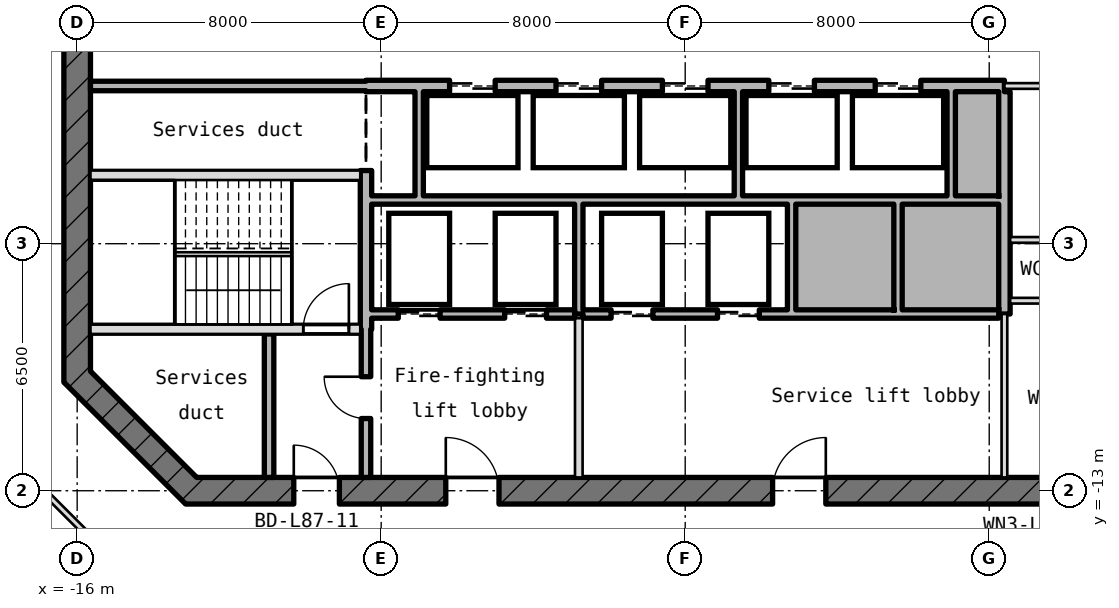
"""IFC4 building model, lengths in metres.
Left out: names, types, materials, properties, quantities, classifications, styles, units other than length and angle.
Written with IfcOpenShell. Run it as: python <this file> out.ifc"""

import sys

from ifc_helpers import new_model, si_unit, direction, frame, frame_2d, origin, place, context, subcontext, project, spatial, rectangle, extrude, element, fill, save


model = new_model("IFC4")
c1 = context("Model", 3, precision=1e-05, world=origin(), true_north=direction((0.0, 1.0)))
c2 = subcontext(c1, "Body", "Model", "MODEL_VIEW")
j1 = project(units=[si_unit("LENGTHUNIT", "METRE"), si_unit("PLANEANGLEUNIT", "RADIAN")], contexts=[c1])
p1 = place(None, origin())
s1 = spatial("IfcSite", under=j1, at=p1, CompositionType="ELEMENT")
p2 = place(p1, origin())
s2 = spatial("IfcBuilding", under=s1, at=p2, CompositionType="ELEMENT")
p3 = place(p2, frame((0.0, 0.0, 384.1)))
s3 = spatial("IfcBuildingStorey", under=s2, at=p3, CompositionType="ELEMENT", Elevation=384.1)
p4 = place(p3, frame((-16.0, 10.145, -0.18), z_axis=(0.0, 0.0, 1.0), x_axis=(0.0, -1.0, 0.0)))
e1 = element("IfcWall", 1, at=p4, inside=s3, PredefinedType="SHEAR", context=c2, shape_type="SweptSolid", body=[
    extrude(rectangle(XDim=20.29, YDim=0.7, at=frame_2d((10.145, 0.0))), origin(), (0.0, 0.0, 1.0), 4.15),
])
p5 = place(p4, frame((8.945, 0.0, 0.18)))
e2 = element("IfcOpeningElement", 2, at=p5, cuts=e1, PredefinedType="OPENING", context=c2, shape_type="SweptSolid", body=[
    extrude(rectangle(XDim=2.4, YDim=2.1, at=frame_2d((1.2, 1.05))), frame((0.0, 0.36, 0.0), z_axis=(0.0, -1.0, 0.0), x_axis=(1.0, 0.0, 0.0)), (0.0, 0.0, 1.0), 0.72),
])
p6 = place(p4, frame((5.545, 0.0, 0.18)))
e3 = element("IfcOpeningElement", 3, at=p6, cuts=e1, PredefinedType="OPENING", context=c2, shape_type="SweptSolid", body=[
    extrude(rectangle(XDim=1.2, YDim=2.1, at=frame_2d((0.6, 1.05))), frame((0.0, 0.36, 0.0), z_axis=(0.0, -1.0, 0.0), x_axis=(1.0, 0.0, 0.0)), (0.0, 0.0, 1.0), 0.72),
])
p7 = place(p3, frame((-16.103, -9.897, -0.18), z_axis=(0.0, 0.0, 1.0), x_axis=(0.707106781187, -0.707106781187, 0.0)))
e4 = element("IfcWall", 4, at=p7, inside=s3, PredefinedType="SHEAR", context=c2, shape_type="SweptSolid", body=[
    extrude(rectangle(XDim=4.533, YDim=0.7, at=frame_2d((2.266, 0.0))), origin(), (0.0, 0.0, 1.0), 4.15),
])
p8 = place(p3, frame((-13.145, -13.0, -0.18), z_axis=(0.0, 0.0, 1.0), x_axis=(1.0, 0.0, 0.0)))
e5 = element("IfcWall", 5, at=p8, inside=s3, PredefinedType="SHEAR", context=c2, shape_type="SweptSolid", body=[
    extrude(rectangle(XDim=26.29, YDim=0.7, at=frame_2d((13.145, 0.0))), origin(), (0.0, 0.0, 1.0), 4.15),
])
p9 = place(p8, frame((2.845, 0.0, 0.18)))
e6 = element("IfcOpeningElement", 6, at=p9, cuts=e5, PredefinedType="OPENING", context=c2, shape_type="SweptSolid", body=[
    extrude(rectangle(XDim=1.2, YDim=2.1, at=frame_2d((0.6, 1.05))), frame((0.0, 0.36, 0.0), z_axis=(0.0, -1.0, 0.0), x_axis=(1.0, 0.0, 0.0)), (0.0, 0.0, 1.0), 0.72),
])
p10 = place(p8, frame((6.845, 0.0, 0.18)))
e7 = element("IfcOpeningElement", 7, at=p10, cuts=e5, PredefinedType="OPENING", context=c2, shape_type="SweptSolid", body=[
    extrude(rectangle(XDim=1.4, YDim=2.1, at=frame_2d((0.7, 1.05))), frame((0.0, 0.36, 0.0), z_axis=(0.0, -1.0, 0.0), x_axis=(1.0, 0.0, 0.0)), (0.0, 0.0, 1.0), 0.72),
])
p11 = place(p8, frame((15.445, 0.0, 0.18)))
e8 = element("IfcOpeningElement", 8, at=p11, cuts=e5, PredefinedType="OPENING", context=c2, shape_type="SweptSolid", body=[
    extrude(rectangle(XDim=1.4, YDim=2.1, at=frame_2d((0.7, 1.05))), frame((0.0, 0.36, 0.0), z_axis=(0.0, -1.0, 0.0), x_axis=(1.0, 0.0, 0.0)), (0.0, 0.0, 1.0), 0.72),
])
p12 = place(p3, frame((-15.65, -8.75, -0.18), z_axis=(0.0, 0.0, 1.0), x_axis=(1.0, 0.0, 0.0)))
e9 = element("IfcWall", 9, at=p12, inside=s3, PredefinedType="SHEAR", context=c2, shape_type="SweptSolid", body=[
    extrude(rectangle(XDim=7.1, YDim=0.25, at=frame_2d((3.55, 0.0))), origin(), (0.0, 0.0, 1.0), 4.15),
])
p13 = place(p12, frame((5.6, 0.0, 0.18)))
e10 = element("IfcOpeningElement", 10, at=p13, cuts=e9, PredefinedType="OPENING", context=c2, shape_type="SweptSolid", body=[
    extrude(rectangle(XDim=1.2, YDim=2.1, at=frame_2d((0.6, 1.05))), frame((0.0, 0.135, 0.0), z_axis=(0.0, -1.0, 0.0), x_axis=(1.0, 0.0, 0.0)), (0.0, 0.0, 1.0), 0.27),
])
p14 = place(p3, frame((-8.25, -8.35, 0.0), z_axis=(0.0, 0.0, 1.0), x_axis=(1.0, 0.0, 0.0)))
e11 = element("IfcWall", 11, at=p14, inside=s3, PredefinedType="STANDARD", context=c2, shape_type="SweptSolid", body=[
    extrude(rectangle(XDim=5.34, YDim=0.22, at=frame_2d((2.67, 0.0))), origin(), (0.0, 0.0, 1.0), 3.97),
])
p15 = place(p14, frame((0.7, 0.0, 0.0)))
e12 = element("IfcOpeningElement", 12, at=p15, cuts=e11, PredefinedType="OPENING", context=c2, shape_type="SweptSolid", body=[
    extrude(rectangle(XDim=1.1, YDim=2.1, at=frame_2d((0.55, 1.05))), frame((0.0, 0.12, 0.0), z_axis=(0.0, -1.0, 0.0), x_axis=(1.0, 0.0, 0.0)), (0.0, 0.0, 1.0), 0.24),
])
p16 = place(p14, frame((3.5, 0.0, 0.0)))
e13 = element("IfcOpeningElement", 13, at=p16, cuts=e11, PredefinedType="OPENING", context=c2, shape_type="SweptSolid", body=[
    extrude(rectangle(XDim=1.1, YDim=2.1, at=frame_2d((0.55, 1.05))), frame((0.0, 0.12, 0.0), z_axis=(0.0, -1.0, 0.0), x_axis=(1.0, 0.0, 0.0)), (0.0, 0.0, 1.0), 0.24),
])
p17 = place(p3, frame((-2.69, -8.35, 0.0), z_axis=(0.0, 0.0, 1.0), x_axis=(1.0, 0.0, 0.0)))
e14 = element("IfcWall", 14, at=p17, inside=s3, PredefinedType="STANDARD", context=c2, shape_type="SweptSolid", body=[
    extrude(rectangle(XDim=10.94, YDim=0.22, at=frame_2d((5.47, 0.0))), origin(), (0.0, 0.0, 1.0), 3.97),
])
p18 = place(p17, frame((0.74, 0.0, 0.0)))
e15 = element("IfcOpeningElement", 15, at=p18, cuts=e14, PredefinedType="OPENING", context=c2, shape_type="SweptSolid", body=[
    extrude(rectangle(XDim=1.1, YDim=2.1, at=frame_2d((0.55, 1.05))), frame((0.0, 0.12, 0.0), z_axis=(0.0, -1.0, 0.0), x_axis=(1.0, 0.0, 0.0)), (0.0, 0.0, 1.0), 0.24),
])
p19 = place(p17, frame((3.54, 0.0, 0.0)))
e16 = element("IfcOpeningElement", 16, at=p19, cuts=e14, PredefinedType="OPENING", context=c2, shape_type="SweptSolid", body=[
    extrude(rectangle(XDim=1.1, YDim=2.1, at=frame_2d((0.55, 1.05))), frame((0.0, 0.12, 0.0), z_axis=(0.0, -1.0, 0.0), x_axis=(1.0, 0.0, 0.0)), (0.0, 0.0, 1.0), 0.24),
])
p20 = place(p3, frame((8.55, -8.0, 0.0), z_axis=(0.0, 0.0, 1.0), x_axis=(1.0, 0.0, 0.0)))
e17 = element("IfcWall", 17, at=p20, inside=s3, PredefinedType="PARTITIONING", context=c2, shape_type="SweptSolid", body=[
    extrude(rectangle(XDim=7.1, YDim=0.15, at=frame_2d((3.55, 0.0))), origin(), (0.0, 0.0, 1.0), 3.97),
])
p21 = place(p20, frame((2.975, 0.0, 0.0)))
e18 = element("IfcOpeningElement", 18, at=p21, cuts=e17, PredefinedType="OPENING", context=c2, shape_type="SweptSolid", body=[
    extrude(rectangle(XDim=1.0, YDim=2.1, at=frame_2d((0.5, 1.05))), frame((0.0, 0.085, 0.0), z_axis=(0.0, -1.0, 0.0), x_axis=(1.0, 0.0, 0.0)), (0.0, 0.0, 1.0), 0.17),
])
p22 = place(p3, frame((8.55, -6.4, 0.0), z_axis=(0.0, 0.0, 1.0), x_axis=(1.0, 0.0, 0.0)))
e19 = element("IfcWall", 19, at=p22, inside=s3, PredefinedType="PARTITIONING", context=c2, shape_type="SweptSolid", body=[
    extrude(rectangle(XDim=7.1, YDim=0.15, at=frame_2d((3.55, 0.0))), origin(), (0.0, 0.0, 1.0), 3.97),
])
p23 = place(p22, frame((2.975, 0.0, 0.0)))
e20 = element("IfcOpeningElement", 20, at=p23, cuts=e19, PredefinedType="OPENING", context=c2, shape_type="SweptSolid", body=[
    extrude(rectangle(XDim=1.0, YDim=2.1, at=frame_2d((0.5, 1.05))), frame((0.0, 0.085, 0.0), z_axis=(0.0, -1.0, 0.0), x_axis=(1.0, 0.0, 0.0)), (0.0, 0.0, 1.0), 0.17),
])
p24 = place(p3, frame((-8.25, -5.35, 0.0), z_axis=(0.0, 0.0, 1.0), x_axis=(1.0, 0.0, 0.0)))
e21 = element("IfcWall", 21, at=p24, inside=s3, PredefinedType="STANDARD", context=c2, shape_type="SweptSolid", body=[
    extrude(rectangle(XDim=16.5, YDim=0.22, at=frame_2d((8.25, 0.0))), origin(), (0.0, 0.0, 1.0), 3.97),
])
p25 = place(p3, frame((-15.65, -4.7, -0.18), z_axis=(0.0, 0.0, 1.0), x_axis=(1.0, 0.0, 0.0)))
e22 = element("IfcWall", 22, at=p25, inside=s3, PredefinedType="SHEAR", context=c2, shape_type="SweptSolid", body=[
    extrude(rectangle(XDim=7.1, YDim=0.25, at=frame_2d((3.55, 0.0))), origin(), (0.0, 0.0, 1.0), 4.15),
])
p26 = place(p3, frame((-15.65, -2.35, 0.0), z_axis=(0.0, 0.0, 1.0), x_axis=(1.0, 0.0, 0.0)))
e23 = element("IfcWall", 23, at=p26, inside=s3, PredefinedType="STANDARD", context=c2, shape_type="SweptSolid", body=[
    extrude(rectangle(XDim=7.25, YDim=0.25, at=frame_2d((3.625, 0.0))), origin(), (0.0, 0.0, 1.0), 3.97),
])
p27 = place(p3, frame((-8.4, -2.35, -0.18), z_axis=(0.0, 0.0, 1.0), x_axis=(1.0, 0.0, 0.0)))
e24 = element("IfcWall", 24, at=p27, inside=s3, PredefinedType="SHEAR", context=c2, shape_type="SweptSolid", body=[
    extrude(rectangle(XDim=16.8, YDim=0.3, at=frame_2d((8.4, 0.0))), origin(), (0.0, 0.0, 1.0), 4.15),
])
p28 = place(p27, frame((2.2, 0.0, 0.18)))
e25 = element("IfcOpeningElement", 25, at=p28, cuts=e24, PredefinedType="OPENING", context=c2, shape_type="SweptSolid", body=[
    extrude(rectangle(XDim=1.2, YDim=2.1, at=frame_2d((0.6, 1.05))), frame((0.0, 0.16, 0.0), z_axis=(0.0, -1.0, 0.0), x_axis=(1.0, 0.0, 0.0)), (0.0, 0.0, 1.0), 0.32),
])
p29 = place(p27, frame((5.0, 0.0, 0.18)))
e26 = element("IfcOpeningElement", 26, at=p29, cuts=e24, PredefinedType="OPENING", context=c2, shape_type="SweptSolid", body=[
    extrude(rectangle(XDim=1.2, YDim=2.1, at=frame_2d((0.6, 1.05))), frame((0.0, 0.16, 0.0), z_axis=(0.0, -1.0, 0.0), x_axis=(1.0, 0.0, 0.0)), (0.0, 0.0, 1.0), 0.32),
])
p30 = place(p27, frame((7.8, 0.0, 0.18)))
e27 = element("IfcOpeningElement", 27, at=p30, cuts=e24, PredefinedType="OPENING", context=c2, shape_type="SweptSolid", body=[
    extrude(rectangle(XDim=1.2, YDim=2.1, at=frame_2d((0.6, 1.05))), frame((0.0, 0.16, 0.0), z_axis=(0.0, -1.0, 0.0), x_axis=(1.0, 0.0, 0.0)), (0.0, 0.0, 1.0), 0.32),
])
p31 = place(p27, frame((10.6, 0.0, 0.18)))
e28 = element("IfcOpeningElement", 28, at=p31, cuts=e24, PredefinedType="OPENING", context=c2, shape_type="SweptSolid", body=[
    extrude(rectangle(XDim=1.2, YDim=2.1, at=frame_2d((0.6, 1.05))), frame((0.0, 0.16, 0.0), z_axis=(0.0, -1.0, 0.0), x_axis=(1.0, 0.0, 0.0)), (0.0, 0.0, 1.0), 0.32),
])
p32 = place(p27, frame((13.4, 0.0, 0.18)))
e29 = element("IfcOpeningElement", 29, at=p32, cuts=e24, PredefinedType="OPENING", context=c2, shape_type="SweptSolid", body=[
    extrude(rectangle(XDim=1.2, YDim=2.1, at=frame_2d((0.6, 1.05))), frame((0.0, 0.16, 0.0), z_axis=(0.0, -1.0, 0.0), x_axis=(1.0, 0.0, 0.0)), (0.0, 0.0, 1.0), 0.32),
])
p33 = place(p3, frame((8.4, -2.35, 0.0), z_axis=(0.0, 0.0, 1.0), x_axis=(1.0, 0.0, 0.0)))
e30 = element("IfcWall", 30, at=p33, inside=s3, PredefinedType="PARTITIONING", context=c2, shape_type="SweptSolid", body=[
    extrude(rectangle(XDim=7.25, YDim=0.15, at=frame_2d((3.625, 0.0))), origin(), (0.0, 0.0, 1.0), 3.97),
])
p34 = place(p3, frame((-10.95, -12.65, 0.0), z_axis=(0.0, 0.0, 1.0), x_axis=(0.0, 1.0, 0.0)))
e31 = element("IfcWall", 31, at=p34, inside=s3, PredefinedType="STANDARD", context=c2, shape_type="SweptSolid", body=[
    extrude(rectangle(XDim=3.775, YDim=0.25, at=frame_2d((1.887, 0.0))), origin(), (0.0, 0.0, 1.0), 3.97),
])
p35 = place(p3, frame((-8.4, -12.65, 0.0), z_axis=(0.0, 0.0, 1.0), x_axis=(0.0, 1.0, 0.0)))
e32 = element("IfcWall", 32, at=p35, inside=s3, PredefinedType="STANDARD", context=c2, shape_type="SweptSolid", body=[
    extrude(rectangle(XDim=3.9, YDim=0.25, at=frame_2d((1.95, 0.0))), origin(), (0.0, 0.0, 1.0), 3.97),
])
p36 = place(p35, frame((1.55, 0.0, 0.0)))
e33 = element("IfcOpeningElement", 33, at=p36, cuts=e32, PredefinedType="OPENING", context=c2, shape_type="SweptSolid", body=[
    extrude(rectangle(XDim=1.1, YDim=2.1, at=frame_2d((0.55, 1.05))), frame((0.0, 0.135, 0.0), z_axis=(0.0, -1.0, 0.0), x_axis=(1.0, 0.0, 0.0)), (0.0, 0.0, 1.0), 0.27),
])
p37 = place(p3, frame((-8.4, -8.75, -0.18), z_axis=(0.0, 0.0, 1.0), x_axis=(0.0, 1.0, 0.0)))
e34 = element("IfcWall", 34, at=p37, inside=s3, PredefinedType="SHEAR", context=c2, shape_type="SweptSolid", body=[
    extrude(rectangle(XDim=4.175, YDim=0.3, at=frame_2d((2.087, 0.0))), origin(), (0.0, 0.0, 1.0), 4.15),
])
p38 = place(p3, frame((-7.0, -5.24, 0.0), z_axis=(0.0, 0.0, 1.0), x_axis=(0.0, 1.0, 0.0)))
e35 = element("IfcWall", 35, at=p38, inside=s3, PredefinedType="STANDARD", context=c2, shape_type="SweptSolid", body=[
    extrude(rectangle(XDim=2.74, YDim=0.22, at=frame_2d((1.37, 0.0))), origin(), (0.0, 0.0, 1.0), 3.97),
])
p39 = place(p3, frame((-2.8, -12.65, 0.0), z_axis=(0.0, 0.0, 1.0), x_axis=(0.0, 1.0, 0.0)))
e36 = element("IfcWall", 36, at=p39, inside=s3, PredefinedType="PARTITIONING", context=c2, shape_type="SweptSolid", body=[
    extrude(rectangle(XDim=4.19, YDim=0.2, at=frame_2d((2.095, 0.0))), origin(), (0.0, 0.0, 1.0), 3.97),
])
p40 = place(p3, frame((-2.8, -8.35, 0.0), z_axis=(0.0, 0.0, 1.0), x_axis=(0.0, 1.0, 0.0)))
e37 = element("IfcWall", 37, at=p40, inside=s3, PredefinedType="STANDARD", context=c2, shape_type="SweptSolid", body=[
    extrude(rectangle(XDim=2.89, YDim=0.22, at=frame_2d((1.445, 0.0))), origin(), (0.0, 0.0, 1.0), 3.97),
])
p41 = place(p3, frame((1.4, -5.24, 0.0), z_axis=(0.0, 0.0, 1.0), x_axis=(0.0, 1.0, 0.0)))
e38 = element("IfcWall", 38, at=p41, inside=s3, PredefinedType="STANDARD", context=c2, shape_type="SweptSolid", body=[
    extrude(rectangle(XDim=2.74, YDim=0.22, at=frame_2d((1.37, 0.0))), origin(), (0.0, 0.0, 1.0), 3.97),
])
for number, where, z_axis, x_axis in (
    (39, (2.8, -8.24, 0.0), (0.0, 0.0, 1.0), (0.0, 1.0, 0.0)),
    (40, (5.6, -8.24, 0.0), (0.0, 0.0, 1.0), (0.0, 1.0, 0.0)),
):
    element("IfcWall", number, at=place(p3, frame(where, z_axis=z_axis, x_axis=x_axis)), inside=s3, PredefinedType="STANDARD", context=c2, shape_type="SweptSolid", body=[
        extrude(rectangle(XDim=2.78, YDim=0.22, at=frame_2d((1.39, 0.0))), origin(), (0.0, 0.0, 1.0), 3.97),
    ])
p42 = place(p3, frame((7.0, -5.24, 0.0), z_axis=(0.0, 0.0, 1.0), x_axis=(0.0, 1.0, 0.0)))
e41 = element("IfcWall", 41, at=p42, inside=s3, PredefinedType="STANDARD", context=c2, shape_type="SweptSolid", body=[
    extrude(rectangle(XDim=2.74, YDim=0.22, at=frame_2d((1.37, 0.0))), origin(), (0.0, 0.0, 1.0), 3.97),
])
p43 = place(p3, frame((8.4, -12.65, 0.0), z_axis=(0.0, 0.0, 1.0), x_axis=(0.0, 1.0, 0.0)))
e42 = element("IfcWall", 42, at=p43, inside=s3, PredefinedType="PARTITIONING", context=c2, shape_type="SweptSolid", body=[
    extrude(rectangle(XDim=4.3, YDim=0.15, at=frame_2d((2.15, 0.0))), origin(), (0.0, 0.0, 1.0), 3.97),
])
p44 = place(p3, frame((8.4, -8.35, -0.18), z_axis=(0.0, 0.0, 1.0), x_axis=(0.0, 1.0, 0.0)))
e43 = element("IfcWall", 43, at=p44, inside=s3, PredefinedType="SHEAR", context=c2, shape_type="SweptSolid", body=[
    extrude(rectangle(XDim=5.85, YDim=0.3, at=frame_2d((2.925, 0.0))), origin(), (0.0, 0.0, 1.0), 4.15),
])
p45 = place(p3, frame((-14.536, -15.354, 0.0), z_axis=(0.0, 0.0, 1.0), x_axis=(-0.707062627028, 0.707150932589, 0.0)))
e44 = element("IfcWall", 44, at=p45, inside=s3, PredefinedType="PARTITIONING", context=c2, shape_type="SweptSolid", body=[
    extrude(rectangle(XDim=2.765, YDim=0.15, at=frame_2d((1.382, 0.0))), origin(), (0.0, 0.0, 1.0), 3.97),
])
p46 = place(p3, frame((-16.49, -13.398, 0.0), z_axis=(0.0, 0.0, 1.0), x_axis=(-0.707144983557, 0.707068576752, 0.0)))
e45 = element("IfcWall", 45, at=p46, inside=s3, PredefinedType="PARTITIONING", context=c2, shape_type="SweptSolid", body=[
    extrude(rectangle(XDim=3.195, YDim=0.15, at=frame_2d((1.598, 0.0))), origin(), (0.0, 0.0, 1.0), 3.513),
])
p47 = place(p28, origin())
e46 = element("IfcDoor", 46, at=p47, inside=s3, OperationType="DOUBLE_DOOR_SLIDING", PredefinedType="DOOR", context=c2, shape_type="SweptSolid", body=[
    extrude(rectangle(XDim=1.2, YDim=2.1, at=frame_2d((0.6, 1.05))), frame((0.0, 0.025, 0.0), z_axis=(0.0, -1.0, 0.0), x_axis=(1.0, 0.0, 0.0)), (0.0, 0.0, 1.0), 0.05),
])
fill(e25, e46)
p48 = place(p29, origin())
e47 = element("IfcDoor", 47, at=p48, inside=s3, OperationType="DOUBLE_DOOR_SLIDING", PredefinedType="DOOR", context=c2, shape_type="SweptSolid", body=[
    extrude(rectangle(XDim=1.2, YDim=2.1, at=frame_2d((0.6, 1.05))), frame((0.0, 0.025, 0.0), z_axis=(0.0, -1.0, 0.0), x_axis=(1.0, 0.0, 0.0)), (0.0, 0.0, 1.0), 0.05),
])
fill(e26, e47)
p49 = place(p30, origin())
e48 = element("IfcDoor", 48, at=p49, inside=s3, OperationType="DOUBLE_DOOR_SLIDING", PredefinedType="DOOR", context=c2, shape_type="SweptSolid", body=[
    extrude(rectangle(XDim=1.2, YDim=2.1, at=frame_2d((0.6, 1.05))), frame((0.0, 0.025, 0.0), z_axis=(0.0, -1.0, 0.0), x_axis=(1.0, 0.0, 0.0)), (0.0, 0.0, 1.0), 0.05),
])
fill(e27, e48)
p50 = place(p31, origin())
e49 = element("IfcDoor", 49, at=p50, inside=s3, OperationType="DOUBLE_DOOR_SLIDING", PredefinedType="DOOR", context=c2, shape_type="SweptSolid", body=[
    extrude(rectangle(XDim=1.2, YDim=2.1, at=frame_2d((0.6, 1.05))), frame((0.0, 0.025, 0.0), z_axis=(0.0, -1.0, 0.0), x_axis=(1.0, 0.0, 0.0)), (0.0, 0.0, 1.0), 0.05),
])
fill(e28, e49)
p51 = place(p32, origin())
e50 = element("IfcDoor", 50, at=p51, inside=s3, OperationType="DOUBLE_DOOR_SLIDING", PredefinedType="DOOR", context=c2, shape_type="SweptSolid", body=[
    extrude(rectangle(XDim=1.2, YDim=2.1, at=frame_2d((0.6, 1.05))), frame((0.0, 0.025, 0.0), z_axis=(0.0, -1.0, 0.0), x_axis=(1.0, 0.0, 0.0)), (0.0, 0.0, 1.0), 0.05),
])
fill(e29, e50)
p52 = place(p15, origin())
e51 = element("IfcDoor", 51, at=p52, inside=s3, OperationType="DOUBLE_DOOR_SLIDING", PredefinedType="DOOR", context=c2, shape_type="SweptSolid", body=[
    extrude(rectangle(XDim=1.1, YDim=2.1, at=frame_2d((0.55, 1.05))), frame((0.0, 0.025, 0.0), z_axis=(0.0, -1.0, 0.0), x_axis=(1.0, 0.0, 0.0)), (0.0, 0.0, 1.0), 0.05),
])
fill(e12, e51)
p53 = place(p16, origin())
e52 = element("IfcDoor", 52, at=p53, inside=s3, OperationType="DOUBLE_DOOR_SLIDING", PredefinedType="DOOR", context=c2, shape_type="SweptSolid", body=[
    extrude(rectangle(XDim=1.1, YDim=2.1, at=frame_2d((0.55, 1.05))), frame((0.0, 0.025, 0.0), z_axis=(0.0, -1.0, 0.0), x_axis=(1.0, 0.0, 0.0)), (0.0, 0.0, 1.0), 0.05),
])
fill(e13, e52)
p54 = place(p18, origin())
e53 = element("IfcDoor", 53, at=p54, inside=s3, OperationType="DOUBLE_DOOR_SLIDING", PredefinedType="DOOR", context=c2, shape_type="SweptSolid", body=[
    extrude(rectangle(XDim=1.1, YDim=2.1, at=frame_2d((0.55, 1.05))), frame((0.0, 0.025, 0.0), z_axis=(0.0, -1.0, 0.0), x_axis=(1.0, 0.0, 0.0)), (0.0, 0.0, 1.0), 0.05),
])
fill(e15, e53)
p55 = place(p19, origin())
e54 = element("IfcDoor", 54, at=p55, inside=s3, OperationType="DOUBLE_DOOR_SLIDING", PredefinedType="DOOR", context=c2, shape_type="SweptSolid", body=[
    extrude(rectangle(XDim=1.1, YDim=2.1, at=frame_2d((0.55, 1.05))), frame((0.0, 0.025, 0.0), z_axis=(0.0, -1.0, 0.0), x_axis=(1.0, 0.0, 0.0)), (0.0, 0.0, 1.0), 0.05),
])
fill(e16, e54)
p56 = place(p13, origin())
e55 = element("IfcDoor", 55, at=p56, inside=s3, OperationType="SINGLE_SWING_RIGHT", PredefinedType="DOOR", context=c2, shape_type="SweptSolid", body=[
    extrude(rectangle(XDim=1.2, YDim=2.1, at=frame_2d((0.6, 1.05))), frame((0.0, 0.025, 0.0), z_axis=(0.0, -1.0, 0.0), x_axis=(1.0, 0.0, 0.0)), (0.0, 0.0, 1.0), 0.05),
])
fill(e10, e55)
p57 = place(p36, origin())
e56 = element("IfcDoor", 56, at=p57, inside=s3, OperationType="SINGLE_SWING_RIGHT", PredefinedType="DOOR", context=c2, shape_type="SweptSolid", body=[
    extrude(rectangle(XDim=1.1, YDim=2.1, at=frame_2d((0.55, 1.05))), frame((0.0, 0.025, 0.0), z_axis=(0.0, -1.0, 0.0), x_axis=(1.0, 0.0, 0.0)), (0.0, 0.0, 1.0), 0.05),
])
fill(e33, e56)
p58 = place(p9, origin())
e57 = element("IfcDoor", 57, at=p58, inside=s3, OperationType="SINGLE_SWING_RIGHT", PredefinedType="DOOR", context=c2, shape_type="SweptSolid", body=[
    extrude(rectangle(XDim=1.2, YDim=2.1, at=frame_2d((0.6, 1.05))), frame((0.0, 0.025, 0.0), z_axis=(0.0, -1.0, 0.0), x_axis=(1.0, 0.0, 0.0)), (0.0, 0.0, 1.0), 0.05),
])
fill(e6, e57)
p59 = place(p10, origin())
e58 = element("IfcDoor", 58, at=p59, inside=s3, OperationType="SINGLE_SWING_RIGHT", PredefinedType="DOOR", context=c2, shape_type="SweptSolid", body=[
    extrude(rectangle(XDim=1.4, YDim=2.1, at=frame_2d((0.7, 1.05))), frame((0.0, 0.025, 0.0), z_axis=(0.0, -1.0, 0.0), x_axis=(1.0, 0.0, 0.0)), (0.0, 0.0, 1.0), 0.05),
])
fill(e7, e58)
p60 = place(p11, origin())
e59 = element("IfcDoor", 59, at=p60, inside=s3, OperationType="SINGLE_SWING_RIGHT", PredefinedType="DOOR", context=c2, shape_type="SweptSolid", body=[
    extrude(rectangle(XDim=1.4, YDim=2.1, at=frame_2d((0.7, 1.05))), frame((0.0, 0.025, 0.0), z_axis=(0.0, -1.0, 0.0), x_axis=(1.0, 0.0, 0.0)), (0.0, 0.0, 1.0), 0.05),
])
fill(e8, e59)
save(model, sys.argv[1])
